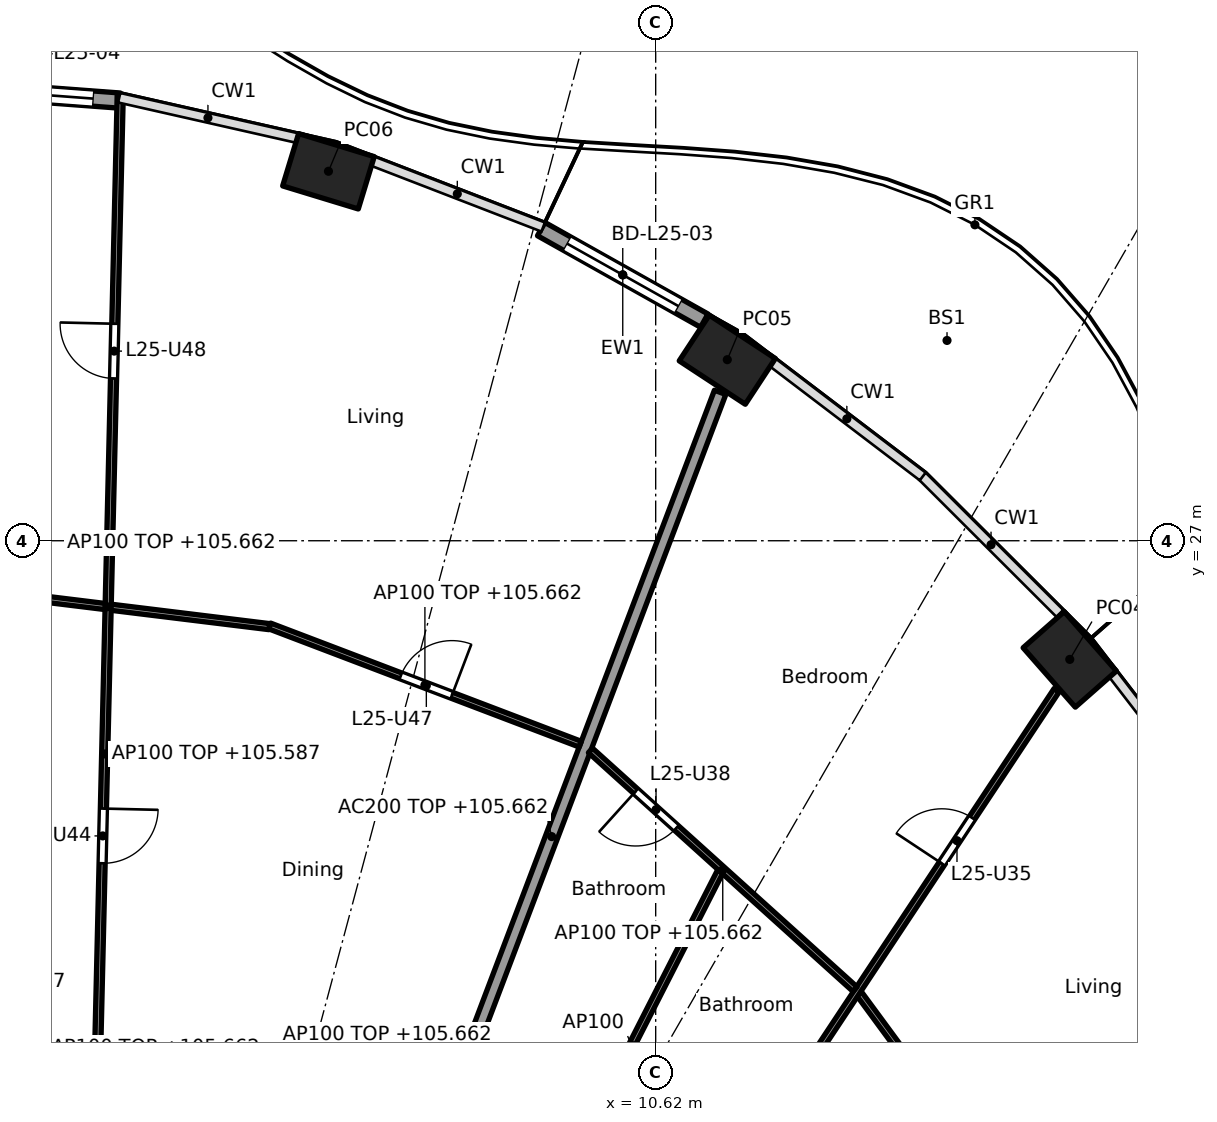
"""IFC4 building model, lengths in metres.
Left out: names, types, materials, properties, quantities, classifications, styles, units other than length and angle.
Written with IfcOpenShell. Run it as: python <this file> out.ifc"""

import sys

from ifc_helpers import new_model, si_unit, direction, frame, frame_2d, origin, origin_2d, place, context, subcontext, project, spatial, rectangle, hollow_rectangle, extrude, element, fill, save


model = new_model("IFC4")
c1 = context("Model", 3, precision=1e-05, world=origin(), true_north=direction((0.0, 1.0)))
c2 = subcontext(c1, "Body", "Model", "MODEL_VIEW")
j1 = project(units=[si_unit("LENGTHUNIT", "METRE"), si_unit("PLANEANGLEUNIT", "RADIAN")], contexts=[c1])
p1 = place(None, origin())
s1 = spatial("IfcSite", under=j1, at=p1, CompositionType="ELEMENT")
p2 = place(p1, origin())
s2 = spatial("IfcBuilding", under=s1, at=p2, CompositionType="ELEMENT")
p3 = place(p2, frame((0.0, 0.0, 102.9)))
s3 = spatial("IfcBuildingStorey", under=s2, at=p3, CompositionType="ELEMENT", Elevation=102.9)
for number, where, z_axis, x_axis in (
    (1, (17.43, 25.049, 0.0), (0.0, 0.0, 1.0), (-0.66, 0.751, 0.0)),
    (2, (11.798, 29.978, 0.0), (0.0, 0.0, 1.0), (-0.836, 0.549, 0.0)),
    (3, (5.239, 33.076, 0.0), (0.0, 0.0, 1.0), (-0.957, 0.292, 0.0)),
):
    element("IfcColumn", number, at=place(p3, frame(where, z_axis=z_axis, x_axis=x_axis)), inside=s3, PredefinedType="COLUMN", context=c2, shape_type="SweptSolid", body=[
        extrude(hollow_rectangle(XDim=1.3, YDim=0.9, WallThickness=0.045, at=origin_2d()), origin(), (0.0, 0.0, 1.0), 3.7),
    ])
p4 = place(p3, frame((8.737, 32.125, 0.0), z_axis=(0.0, 0.0, 1.0), x_axis=(0.872071158476, -0.489379090843, 0.0)))
e4 = element("IfcWall", 4, at=p4, inside=s3, PredefinedType="SOLIDWALL", context=c2, shape_type="SweptSolid", body=[
    extrude(rectangle(XDim=3.076, YDim=0.25, at=frame_2d((1.538, 0.0))), origin(), (0.0, 0.0, 1.0), 3.44),
])
p5 = place(p4, frame((0.488, 0.0, 0.0)))
e5 = element("IfcOpeningElement", 5, at=p5, cuts=e4, PredefinedType="OPENING", context=c2, shape_type="SweptSolid", body=[
    extrude(rectangle(XDim=2.1, YDim=2.4, at=frame_2d((1.05, 1.2))), frame((0.0, 0.135, 0.0), z_axis=(0.0, -1.0, 0.0), x_axis=(1.0, 0.0, 0.0)), (0.0, 0.0, 1.0), 0.27),
])
p6 = place(p3, frame((-1.161, 34.46, 0.0), z_axis=(0.0, 0.0, 1.0), x_axis=(0.997232262224, -0.074349278273, 0.0)))
e6 = element("IfcWall", 6, at=p6, inside=s3, PredefinedType="SOLIDWALL", context=c2, shape_type="SweptSolid", body=[
    extrude(rectangle(XDim=2.975, YDim=0.25, at=frame_2d((1.488, 0.0))), origin(), (0.0, 0.0, 1.0), 3.44),
])
p7 = place(p6, frame((0.438, 0.0, 0.0)))
e7 = element("IfcOpeningElement", 7, at=p7, cuts=e6, PredefinedType="OPENING", context=c2, shape_type="SweptSolid", body=[
    extrude(rectangle(XDim=2.1, YDim=2.4, at=frame_2d((1.05, 1.2))), frame((0.0, 0.135, 0.0), z_axis=(0.0, -1.0, 0.0), x_axis=(1.0, 0.0, 0.0)), (0.0, 0.0, 1.0), 0.27),
])
p8 = place(p3, frame((6.141, 14.829, 0.0), z_axis=(0.0, 0.0, 1.0), x_axis=(0.354477134193, 0.935064682968, 0.0)))
e8 = element("IfcWall", 8, at=p8, inside=s3, PredefinedType="PARTITIONING", context=c2, shape_type="SweptSolid", body=[
    extrude(rectangle(XDim=15.626, YDim=0.2, at=frame_2d((7.813, 0.0))), origin(), (0.0, 0.0, 1.0), 2.762),
])
p9 = place(p3, frame((17.567, 14.653, 0.0), z_axis=(0.0, 0.0, 1.0), x_axis=(-0.592391983588, 0.80564988536, 0.0)))
e9 = element("IfcWall", 9, at=p9, inside=s3, PredefinedType="PARTITIONING", context=c2, shape_type="SweptSolid", body=[
    extrude(rectangle(XDim=6.08, YDim=0.1, at=frame_2d((3.04, 0.0))), origin(), (0.0, 0.0, 1.0), 2.762),
])
p10 = place(p9, frame((2.59, 0.0, 0.0)))
e10 = element("IfcOpeningElement", 10, at=p10, cuts=e9, PredefinedType="OPENING", context=c2, shape_type="SweptSolid", body=[
    extrude(rectangle(XDim=0.9, YDim=2.1, at=frame_2d((0.45, 1.05))), frame((0.0, 0.06, 0.0), z_axis=(0.0, -1.0, 0.0), x_axis=(1.0, 0.0, 0.0)), (0.0, 0.0, 1.0), 0.12),
])
p11 = place(p3, frame((7.713, 10.195, 0.0), z_axis=(0.0, 0.0, 1.0), x_axis=(0.552111071171, 0.833770571015, 0.0)))
e11 = element("IfcWall", 11, at=p11, inside=s3, PredefinedType="PARTITIONING", context=c2, shape_type="SweptSolid", body=[
    extrude(rectangle(XDim=17.208, YDim=0.1, at=frame_2d((8.604, 0.0))), origin(), (0.0, 0.0, 1.0), 2.687),
])
p12 = place(p11, frame((1.976, 0.0, 0.0)))
e12 = element("IfcOpeningElement", 12, at=p12, cuts=e11, PredefinedType="OPENING", context=c2, shape_type="SweptSolid", body=[
    extrude(rectangle(XDim=0.9, YDim=2.1, at=frame_2d((0.45, 1.05))), frame((0.0, 0.06, 0.0), z_axis=(0.0, -1.0, 0.0), x_axis=(1.0, 0.0, 0.0)), (0.0, 0.0, 1.0), 0.12),
])
p13 = place(p11, frame((7.611, 0.0, 0.0)))
e13 = element("IfcOpeningElement", 13, at=p13, cuts=e11, PredefinedType="OPENING", context=c2, shape_type="SweptSolid", body=[
    extrude(rectangle(XDim=0.9, YDim=2.1, at=frame_2d((0.45, 1.05))), frame((0.0, 0.06, 0.0), z_axis=(0.0, -1.0, 0.0), x_axis=(1.0, 0.0, 0.0)), (0.0, 0.0, 1.0), 0.12),
])
p14 = place(p11, frame((13.79, 0.0, 0.0)))
e14 = element("IfcOpeningElement", 14, at=p14, cuts=e11, PredefinedType="OPENING", context=c2, shape_type="SweptSolid", body=[
    extrude(rectangle(XDim=0.9, YDim=2.1, at=frame_2d((0.45, 1.05))), frame((0.0, 0.06, 0.0), z_axis=(0.0, -1.0, 0.0), x_axis=(1.0, 0.0, 0.0)), (0.0, 0.0, 1.0), 0.12),
])
p15 = place(p3, frame((13.898, 19.625, 0.0), z_axis=(0.0, 0.0, 1.0), x_axis=(-0.742396654702, 0.669960601146, 0.0)))
e15 = element("IfcWall", 15, at=p15, inside=s3, PredefinedType="PARTITIONING", context=c2, shape_type="SweptSolid", body=[
    extrude(rectangle(XDim=5.861, YDim=0.1, at=frame_2d((2.931, 0.0))), origin(), (0.0, 0.0, 1.0), 2.762),
])
p16 = place(p15, frame((3.958, 0.0, 0.0)))
e16 = element("IfcOpeningElement", 16, at=p16, cuts=e15, PredefinedType="OPENING", context=c2, shape_type="SweptSolid", body=[
    extrude(rectangle(XDim=0.9, YDim=2.1, at=frame_2d((0.45, 1.05))), frame((0.0, 0.06, 0.0), z_axis=(0.0, -1.0, 0.0), x_axis=(1.0, 0.0, 0.0)), (0.0, 0.0, 1.0), 0.12),
])
p17 = place(p3, frame((8.769, 15.846, 0.0), z_axis=(0.0, 0.0, 1.0), x_axis=(0.454067187552, 0.890967445639, 0.0)))
e17 = element("IfcWall", 17, at=p17, inside=s3, PredefinedType="PARTITIONING", context=c2, shape_type="SweptSolid", body=[
    extrude(rectangle(XDim=6.414, YDim=0.1, at=frame_2d((3.207, 0.0))), origin(), (0.0, 0.0, 1.0), 3.44),
])
p18 = place(p3, frame((9.379, 23.655, 0.0), z_axis=(0.0, 0.0, 1.0), x_axis=(-0.934609369022, 0.355675873986, 0.0)))
e18 = element("IfcWall", 18, at=p18, inside=s3, PredefinedType="PARTITIONING", context=c2, shape_type="SweptSolid", body=[
    extrude(rectangle(XDim=5.467, YDim=0.1, at=frame_2d((2.733, 0.0))), origin(), (0.0, 0.0, 1.0), 2.762),
])
p19 = place(p18, frame((2.258, 0.0, 0.0)))
e19 = element("IfcOpeningElement", 19, at=p19, cuts=e18, PredefinedType="OPENING", context=c2, shape_type="SweptSolid", body=[
    extrude(rectangle(XDim=0.9, YDim=2.1, at=frame_2d((0.45, 1.05))), frame((0.0, 0.06, 0.0), z_axis=(0.0, -1.0, 0.0), x_axis=(1.0, 0.0, 0.0)), (0.0, 0.0, 1.0), 0.12),
])
p20 = place(p3, frame((4.267, 25.587, 0.0), z_axis=(0.0, 0.0, 1.0), x_axis=(-0.992576206119, 0.121624319302, 0.0)))
e20 = element("IfcWall", 20, at=p20, inside=s3, PredefinedType="PARTITIONING", context=c2, shape_type="SweptSolid", body=[
    extrude(rectangle(XDim=5.374, YDim=0.1, at=frame_2d((2.687, 0.0))), origin(), (0.0, 0.0, 1.0), 2.762),
])
p21 = place(p3, frame((1.303, 12.665, 0.0), z_axis=(0.0, 0.0, 1.0), x_axis=(0.023564110689, 0.999722327793, 0.0)))
e21 = element("IfcWall", 21, at=p21, inside=s3, PredefinedType="PARTITIONING", context=c2, shape_type="SweptSolid", body=[
    extrude(rectangle(XDim=21.664, YDim=0.1, at=frame_2d((10.832, 0.0))), origin(), (0.0, 0.0, 1.0), 2.687),
])
p22 = place(p21, frame((2.407, 0.0, 0.0)))
e22 = element("IfcOpeningElement", 22, at=p22, cuts=e21, PredefinedType="OPENING", context=c2, shape_type="SweptSolid", body=[
    extrude(rectangle(XDim=0.9, YDim=2.1, at=frame_2d((0.45, 1.05))), frame((0.0, 0.06, 0.0), z_axis=(0.0, -1.0, 0.0), x_axis=(1.0, 0.0, 0.0)), (0.0, 0.0, 1.0), 0.12),
])
p23 = place(p21, frame((9.034, 0.0, 0.0)))
e23 = element("IfcOpeningElement", 23, at=p23, cuts=e21, PredefinedType="OPENING", context=c2, shape_type="SweptSolid", body=[
    extrude(rectangle(XDim=0.9, YDim=2.1, at=frame_2d((0.45, 1.05))), frame((0.0, 0.06, 0.0), z_axis=(0.0, -1.0, 0.0), x_axis=(1.0, 0.0, 0.0)), (0.0, 0.0, 1.0), 0.12),
])
p24 = place(p21, frame((17.009, 0.0, 0.0)))
e24 = element("IfcOpeningElement", 24, at=p24, cuts=e21, PredefinedType="OPENING", context=c2, shape_type="SweptSolid", body=[
    extrude(rectangle(XDim=0.9, YDim=2.1, at=frame_2d((0.45, 1.05))), frame((0.0, 0.06, 0.0), z_axis=(0.0, -1.0, 0.0), x_axis=(1.0, 0.0, 0.0)), (0.0, 0.0, 1.0), 0.12),
])
p25 = place(p5, origin())
e25 = element("IfcDoor", 25, at=p25, inside=s3, OperationType="SLIDING_TO_LEFT", PredefinedType="DOOR", context=c2, shape_type="SweptSolid", body=[
    extrude(rectangle(XDim=2.1, YDim=2.4, at=frame_2d((1.05, 1.2))), frame((0.0, 0.025, 0.0), z_axis=(0.0, -1.0, 0.0), x_axis=(1.0, 0.0, 0.0)), (0.0, 0.0, 1.0), 0.05),
])
fill(e5, e25)
p26 = place(p7, origin())
e26 = element("IfcDoor", 26, at=p26, inside=s3, OperationType="SLIDING_TO_LEFT", PredefinedType="DOOR", context=c2, shape_type="SweptSolid", body=[
    extrude(rectangle(XDim=2.1, YDim=2.4, at=frame_2d((1.05, 1.2))), frame((0.0, 0.025, 0.0), z_axis=(0.0, -1.0, 0.0), x_axis=(1.0, 0.0, 0.0)), (0.0, 0.0, 1.0), 0.05),
])
fill(e7, e26)
p27 = place(p14, origin())
e27 = element("IfcDoor", 27, at=p27, inside=s3, OperationType="SINGLE_SWING_LEFT", PredefinedType="DOOR", context=c2, shape_type="SweptSolid", body=[
    extrude(rectangle(XDim=0.9, YDim=2.1, at=frame_2d((0.45, 1.05))), frame((0.0, 0.025, 0.0), z_axis=(0.0, -1.0, 0.0), x_axis=(1.0, 0.0, 0.0)), (0.0, 0.0, 1.0), 0.05),
])
fill(e14, e27)
p28 = place(p16, origin())
e28 = element("IfcDoor", 28, at=p28, inside=s3, OperationType="SINGLE_SWING_RIGHT", PredefinedType="DOOR", context=c2, shape_type="SweptSolid", body=[
    extrude(rectangle(XDim=0.9, YDim=2.1, at=frame_2d((0.45, 1.05))), frame((0.0, 0.025, 0.0), z_axis=(0.0, -1.0, 0.0), x_axis=(1.0, 0.0, 0.0)), (0.0, 0.0, 1.0), 0.05),
])
fill(e16, e28)
p29 = place(p23, frame((0.9, 0.0, 0.0), x_axis=(-1.0, 0.0, 0.0)))
e29 = element("IfcDoor", 29, at=p29, inside=s3, OperationType="SINGLE_SWING_LEFT", PredefinedType="DOOR", context=c2, shape_type="SweptSolid", body=[
    extrude(rectangle(XDim=0.9, YDim=2.1, at=frame_2d((0.45, 1.05))), frame((0.0, 0.025, 0.0), z_axis=(0.0, -1.0, 0.0), x_axis=(1.0, 0.0, 0.0)), (0.0, 0.0, 1.0), 0.05),
])
fill(e23, e29)
p30 = place(p19, frame((0.9, 0.0, 0.0), x_axis=(-1.0, 0.0, 0.0)))
e30 = element("IfcDoor", 30, at=p30, inside=s3, OperationType="SINGLE_SWING_RIGHT", PredefinedType="DOOR", context=c2, shape_type="SweptSolid", body=[
    extrude(rectangle(XDim=0.9, YDim=2.1, at=frame_2d((0.45, 1.05))), frame((0.0, 0.025, 0.0), z_axis=(0.0, -1.0, 0.0), x_axis=(1.0, 0.0, 0.0)), (0.0, 0.0, 1.0), 0.05),
])
fill(e19, e30)
p31 = place(p24, origin())
e31 = element("IfcDoor", 31, at=p31, inside=s3, OperationType="SINGLE_SWING_RIGHT", PredefinedType="DOOR", context=c2, shape_type="SweptSolid", body=[
    extrude(rectangle(XDim=0.9, YDim=2.1, at=frame_2d((0.45, 1.05))), frame((0.0, 0.025, 0.0), z_axis=(0.0, -1.0, 0.0), x_axis=(1.0, 0.0, 0.0)), (0.0, 0.0, 1.0), 0.05),
])
fill(e24, e31)
save(model, sys.argv[1])
